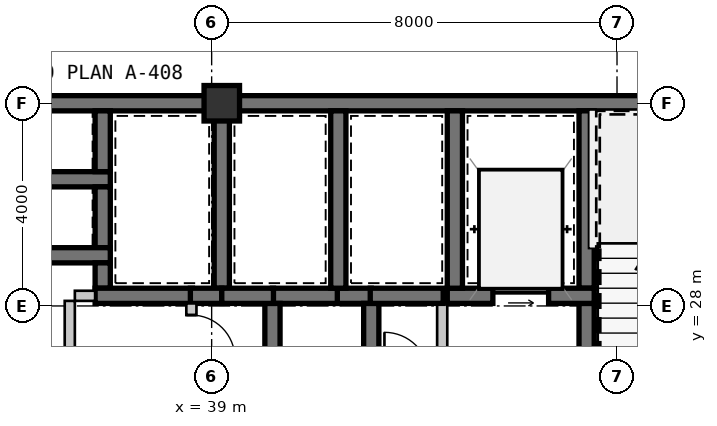
"""IFC4 building model, lengths in metres.
Left out: names, types, materials, properties, quantities, classifications, styles, units other than length and angle.
Written with IfcOpenShell. Run it as: python <this file> out.ifc"""

import sys

from ifc_helpers import new_model, si_unit, direction, frame, frame_2d, origin, origin_2d, place, context, subcontext, project, spatial, rectangle, extrude, source, transform, mapped, element, fill, save


model = new_model("IFC4")
c1 = context("Model", 3, precision=1e-05, world=origin(), true_north=direction((0.0, 1.0)))
c2 = subcontext(c1, "Body", "Model", "MODEL_VIEW")
j1 = project(units=[si_unit("LENGTHUNIT", "METRE"), si_unit("PLANEANGLEUNIT", "RADIAN")], contexts=[c1])
p1 = place(None, origin())
s1 = spatial("IfcSite", under=j1, at=p1, CompositionType="ELEMENT")
p2 = place(p1, origin())
s2 = spatial("IfcBuilding", under=s1, at=p2, CompositionType="ELEMENT")
p3 = place(p2, frame((0.0, 0.0, 99.75)))
s3 = spatial("IfcBuildingStorey", under=s2, at=p3, CompositionType="ELEMENT", Elevation=99.75)
m1 = source(origin(), c2, "Body", "SweptSolid", [
    extrude(rectangle(XDim=0.7, YDim=0.7, at=origin_2d()), origin(), (0.0, 0.0, 1.0), 3.15),
])
p4 = place(p3, frame((39.2, 32.0, 0.0), z_axis=(0.0, 0.0, 1.0), x_axis=(1.0, 0.0, 0.0)))
e1 = element("IfcColumn", 1, at=p4, inside=s3, PredefinedType="COLUMN", context=c2, shape_type="MappedRepresentation", body=[
    mapped(m1, transform((0.0, 0.0, 0.0), scale=1.0)),
])
m2 = source(origin(), c2, "Body", "SweptSolid", [
    extrude(rectangle(XDim=11.2, YDim=0.3, at=frame_2d((5.6, 0.0))), origin(), (0.0, 0.0, 1.0), 2.93),
])
p5 = place(p3, frame((28.0, 32.0, 0.0), z_axis=(0.0, 0.0, 1.0), x_axis=(1.0, 0.0, 0.0)))
e2 = element("IfcWall", 2, at=p5, inside=s3, PredefinedType="SHEAR", context=c2, shape_type="MappedRepresentation", body=[
    mapped(m2, transform((0.0, 0.0, 0.0), scale=1.0)),
])
m3 = source(origin(), c2, "Body", "SweptSolid", [
    extrude(rectangle(XDim=11.95, YDim=0.3, at=frame_2d((5.975, 0.0))), origin(), (0.0, 0.0, 1.0), 2.93),
])
p6 = place(p3, frame((39.2, 32.0, 0.0), z_axis=(0.0, 0.0, 1.0), x_axis=(1.0, 0.0, 0.0)))
e3 = element("IfcWall", 3, at=p6, inside=s3, PredefinedType="SHEAR", context=c2, shape_type="MappedRepresentation", body=[
    mapped(m3, transform((0.0, 0.0, 0.0), scale=1.0)),
])
m4 = source(origin(), c2, "Body", "SweptSolid", [
    extrude(rectangle(XDim=3.5, YDim=0.3, at=frame_2d((1.75, 0.0))), origin(), (0.0, 0.0, 1.0), 2.93),
])
p7 = place(p3, frame((46.4, 31.85, 0.0), z_axis=(0.0, 0.0, 1.0), x_axis=(0.0, -1.0, 0.0)))
e4 = element("IfcWall", 4, at=p7, inside=s3, PredefinedType="SHEAR", context=c2, shape_type="MappedRepresentation", body=[
    mapped(m4, transform((0.0, 0.0, 0.0), scale=1.0)),
])
m5 = source(origin(), c2, "Body", "SweptSolid", [
    extrude(rectangle(XDim=3.9, YDim=0.3, at=frame_2d((1.95, 0.0))), origin(), (0.0, 0.0, 1.0), 2.93),
])
p8 = place(p3, frame((46.4, 28.05, 0.0), z_axis=(0.0, 0.0, 1.0), x_axis=(0.0, -1.0, 0.0)))
e5 = element("IfcWall", 5, at=p8, inside=s3, PredefinedType="SHEAR", context=c2, shape_type="MappedRepresentation", body=[
    mapped(m5, transform((0.0, 0.0, 0.0), scale=1.0)),
])
m6 = source(origin(), c2, "Body", "SweptSolid", [
    extrude(rectangle(XDim=1.05, YDim=2.1, at=frame_2d((0.525, 1.05))), frame((0.0, 0.16, 0.0), z_axis=(0.0, -1.0, 0.0), x_axis=(1.0, 0.0, 0.0)), (0.0, 0.0, 1.0), 0.32),
])
p9 = place(p8, frame((2.125, 0.0, 0.0)))
e6 = element("IfcOpeningElement", 6, at=p9, cuts=e5, PredefinedType="OPENING", context=c2, shape_type="MappedRepresentation", body=[
    mapped(m6, transform((0.0, 0.0, 0.0), scale=1.0)),
])
m7 = source(origin(), c2, "Body", "SweptSolid", [
    extrude(rectangle(XDim=2.9, YDim=0.3, at=frame_2d((1.45, 0.0))), origin(), (0.0, 0.0, 1.0), 2.93),
])
p10 = place(p3, frame((43.65, 28.2, 0.0), z_axis=(0.0, 0.0, 1.0), x_axis=(1.0, 0.0, 0.0)))
e7 = element("IfcWall", 7, at=p10, inside=s3, PredefinedType="SHEAR", context=c2, shape_type="MappedRepresentation", body=[
    mapped(m7, transform((0.0, 0.0, 0.0), scale=1.0)),
])
m8 = source(origin(), c2, "Body", "SweptSolid", [
    extrude(rectangle(XDim=1.1, YDim=2.15, at=frame_2d((0.55, 1.075))), frame((0.0, 0.16, 0.0), z_axis=(0.0, -1.0, 0.0), x_axis=(1.0, 0.0, 0.0)), (0.0, 0.0, 1.0), 0.32),
])
p11 = place(p10, frame((0.9, 0.0, 0.0)))
e8 = element("IfcOpeningElement", 8, at=p11, cuts=e7, PredefinedType="OPENING", context=c2, shape_type="MappedRepresentation", body=[
    mapped(m8, transform((0.0, 0.0, 0.0), scale=1.0)),
])
p12 = place(p3, frame((43.8, 31.85, 0.0), z_axis=(0.0, 0.0, 1.0), x_axis=(0.0, -1.0, 0.0)))
e9 = element("IfcWall", 9, at=p12, inside=s3, PredefinedType="SHEAR", context=c2, shape_type="MappedRepresentation", body=[
    mapped(m4, transform((0.0, 0.0, 0.0), scale=1.0)),
])
m9 = source(origin(), c2, "Body", "SweptSolid", [
    extrude(rectangle(XDim=1.35, YDim=0.2, at=frame_2d((0.675, 0.0))), origin(), (0.0, 0.0, 1.0), 2.93),
])
p13 = place(p3, frame((43.55, 28.05, 0.0), z_axis=(0.0, 0.0, 1.0), x_axis=(0.0, -1.0, 0.0)))
e10 = element("IfcWall", 10, at=p13, inside=s3, PredefinedType="SOLIDWALL", context=c2, shape_type="MappedRepresentation", body=[
    mapped(m9, transform((0.0, 0.0, 0.0), scale=1.0)),
])
m10 = source(origin(), c2, "Body", "SweptSolid", [
    extrude(rectangle(XDim=2.0, YDim=0.3, at=frame_2d((1.0, 0.0))), origin(), (0.0, 0.0, 1.0), 2.93),
])
p14 = place(p3, frame((35.0, 30.5, 0.0), z_axis=(0.0, 0.0, 1.0), x_axis=(1.0, 0.0, 0.0)))
e11 = element("IfcWall", 11, at=p14, inside=s3, PredefinedType="SHEAR", context=c2, shape_type="MappedRepresentation", body=[
    mapped(m10, transform((0.0, 0.0, 0.0), scale=1.0)),
])
m11 = source(origin(), c2, "Body", "SweptSolid", [
    extrude(rectangle(XDim=1.2, YDim=0.3, at=frame_2d((0.6, 0.0))), origin(), (0.0, 0.0, 1.0), 2.93),
])
for number, where, z_axis, x_axis in (
    (12, (36.85, 30.65, 0.0), (0.0, 0.0, 1.0), (0.0, 1.0, 0.0)),
    (13, (36.85, 29.15, 0.0), (0.0, 0.0, 1.0), (0.0, 1.0, 0.0)),
):
    element("IfcWall", number, at=place(p3, frame(where, z_axis=z_axis, x_axis=x_axis)), inside=s3, PredefinedType="SHEAR", context=c2, shape_type="MappedRepresentation", body=[
        mapped(m11, transform((0.0, 0.0, 0.0), scale=1.0)),
    ])
p15 = place(p3, frame((35.0, 29.0, 0.0), z_axis=(0.0, 0.0, 1.0), x_axis=(1.0, 0.0, 0.0)))
e14 = element("IfcWall", 14, at=p15, inside=s3, PredefinedType="SHEAR", context=c2, shape_type="MappedRepresentation", body=[
    mapped(m10, transform((0.0, 0.0, 0.0), scale=1.0)),
])
m12 = source(origin(), c2, "Body", "SweptSolid", [
    extrude(rectangle(XDim=1.32, YDim=0.3, at=frame_2d((0.66, 0.0))), origin(), (0.0, 0.0, 1.0), 2.93),
])
p16 = place(p3, frame((41.52, 28.2, 0.0), z_axis=(0.0, 0.0, 1.0), x_axis=(-1.0, 0.0, 0.0)))
e15 = element("IfcWall", 15, at=p16, inside=s3, PredefinedType="SHEAR", context=c2, shape_type="MappedRepresentation", body=[
    mapped(m12, transform((0.0, 0.0, 0.0), scale=1.0)),
])
m13 = source(origin(), c2, "Body", "SweptSolid", [
    extrude(rectangle(XDim=0.67, YDim=0.3, at=frame_2d((0.335, 0.0))), origin(), (0.0, 0.0, 1.0), 2.93),
])
p17 = place(p3, frame((42.15, 28.2, 0.0), z_axis=(0.0, 0.0, 1.0), x_axis=(-1.0, 0.0, 0.0)))
e16 = element("IfcWall", 16, at=p17, inside=s3, PredefinedType="SHEAR", context=c2, shape_type="MappedRepresentation", body=[
    mapped(m13, transform((0.0, 0.0, 0.0), scale=1.0)),
])
m14 = source(origin(), c2, "Body", "SweptSolid", [
    extrude(rectangle(XDim=1.3, YDim=0.3, at=frame_2d((0.65, 0.0))), origin(), (0.0, 0.0, 1.0), 2.93),
])
for number, where, z_axis, x_axis in (
    (17, (40.2, 28.05, 0.0), (0.0, 0.0, 1.0), (0.0, -1.0, 0.0)),
    (18, (42.15, 26.75, 0.0), (0.0, 0.0, 1.0), (0.0, 1.0, 0.0)),
):
    element("IfcWall", number, at=place(p3, frame(where, z_axis=z_axis, x_axis=x_axis)), inside=s3, PredefinedType="SHEAR", context=c2, shape_type="MappedRepresentation", body=[
        mapped(m14, transform((0.0, 0.0, 0.0), scale=1.0)),
    ])
p18 = place(p3, frame((39.2, 28.35, 0.0), z_axis=(0.0, 0.0, 1.0), x_axis=(0.0, 1.0, 0.0)))
e19 = element("IfcWall", 19, at=p18, inside=s3, PredefinedType="SHEAR", context=c2, shape_type="MappedRepresentation", body=[
    mapped(m4, transform((0.0, 0.0, 0.0), scale=1.0)),
])
m15 = source(origin(), c2, "Body", "SweptSolid", [
    extrude(rectangle(XDim=0.5, YDim=0.3, at=frame_2d((0.25, 0.0))), origin(), (0.0, 0.0, 1.0), 2.93),
])
p19 = place(p3, frame((36.85, 28.85, 0.0), z_axis=(0.0, 0.0, 1.0), x_axis=(0.0, -1.0, 0.0)))
e20 = element("IfcWall", 20, at=p19, inside=s3, PredefinedType="SHEAR", context=c2, shape_type="MappedRepresentation", body=[
    mapped(m15, transform((0.0, 0.0, 0.0), scale=1.0)),
])
m16 = source(origin(), c2, "Body", "SweptSolid", [
    extrude(rectangle(XDim=1.92, YDim=0.3, at=frame_2d((0.96, 0.0))), origin(), (0.0, 0.0, 1.0), 2.93),
])
p20 = place(p3, frame((36.7, 28.2, 0.0), z_axis=(0.0, 0.0, 1.0), x_axis=(1.0, 0.0, 0.0)))
e21 = element("IfcWall", 21, at=p20, inside=s3, PredefinedType="SHEAR", context=c2, shape_type="MappedRepresentation", body=[
    mapped(m16, transform((0.0, 0.0, 0.0), scale=1.0)),
])
m17 = source(origin(), c2, "Body", "SweptSolid", [
    extrude(rectangle(XDim=0.62, YDim=0.3, at=frame_2d((0.31, 0.0))), origin(), (0.0, 0.0, 1.0), 2.93),
])
p21 = place(p3, frame((38.58, 28.2, 0.0), z_axis=(0.0, 0.0, 1.0), x_axis=(1.0, 0.0, 0.0)))
e22 = element("IfcWall", 22, at=p21, inside=s3, PredefinedType="SHEAR", context=c2, shape_type="MappedRepresentation", body=[
    mapped(m17, transform((0.0, 0.0, 0.0), scale=1.0)),
])
p22 = place(p3, frame((41.5, 28.35, 0.0), z_axis=(0.0, 0.0, 1.0), x_axis=(0.0, 1.0, 0.0)))
e23 = element("IfcWall", 23, at=p22, inside=s3, PredefinedType="SHEAR", context=c2, shape_type="MappedRepresentation", body=[
    mapped(m4, transform((0.0, 0.0, 0.0), scale=1.0)),
])
m18 = source(origin(), c2, "Body", "SweptSolid", [
    extrude(rectangle(XDim=1.02, YDim=0.3, at=frame_2d((0.51, 0.0))), origin(), (0.0, 0.0, 1.0), 2.93),
])
p23 = place(p3, frame((39.2, 28.2, 0.0), z_axis=(0.0, 0.0, 1.0), x_axis=(1.0, 0.0, 0.0)))
e24 = element("IfcWall", 24, at=p23, inside=s3, PredefinedType="SHEAR", context=c2, shape_type="MappedRepresentation", body=[
    mapped(m18, transform((0.0, 0.0, 0.0), scale=1.0)),
])
m19 = source(origin(), c2, "Body", "SweptSolid", [
    extrude(rectangle(XDim=1.44, YDim=0.3, at=frame_2d((0.72, 0.0))), origin(), (0.0, 0.0, 1.0), 2.93),
])
p24 = place(p3, frame((42.13, 28.2, 0.0), z_axis=(0.0, 0.0, 1.0), x_axis=(1.0, 0.0, 0.0)))
e25 = element("IfcWall", 25, at=p24, inside=s3, PredefinedType="SHEAR", context=c2, shape_type="MappedRepresentation", body=[
    mapped(m19, transform((0.0, 0.0, 0.0), scale=1.0)),
])
m20 = source(origin(), c2, "Body", "SweptSolid", [
    extrude(rectangle(XDim=1.9, YDim=0.2, at=frame_2d((0.95, 0.0))), origin(), (0.0, 0.0, 1.0), 2.93),
])
p25 = place(p3, frame((36.2, 28.1, 0.0), z_axis=(0.0, 0.0, 1.0), x_axis=(0.0, -1.0, 0.0)))
e26 = element("IfcWall", 26, at=p25, inside=s3, PredefinedType="SOLIDWALL", context=c2, shape_type="MappedRepresentation", body=[
    mapped(m20, transform((0.0, 0.0, 0.0), scale=1.0)),
])
m21 = source(origin(), c2, "Body", "SweptSolid", [
    extrude(rectangle(XDim=0.4, YDim=0.2, at=frame_2d((0.2, 0.0))), origin(), (0.0, 0.0, 1.0), 2.93),
])
p26 = place(p3, frame((36.7, 28.2, 0.0), z_axis=(0.0, 0.0, 1.0), x_axis=(-1.0, 0.0, 0.0)))
e27 = element("IfcWall", 27, at=p26, inside=s3, PredefinedType="SOLIDWALL", context=c2, shape_type="MappedRepresentation", body=[
    mapped(m21, transform((0.0, 0.0, 0.0), scale=1.0)),
])
m22 = source(origin(), c2, "Body", "SweptSolid", [
    extrude(rectangle(XDim=1.47, YDim=0.2, at=frame_2d((0.735, 0.0))), origin(), (0.0, 0.0, 1.0), 2.93),
])
p27 = place(p3, frame((38.6, 28.05, 0.0), z_axis=(0.0, 0.0, 1.0), x_axis=(0.0, -1.0, 0.0)))
e28 = element("IfcWall", 28, at=p27, inside=s3, PredefinedType="SOLIDWALL", context=c2, shape_type="MappedRepresentation", body=[
    mapped(m22, transform((0.0, 0.0, 0.0), scale=1.0)),
])
m23 = source(origin(), c2, "Body", "SweptSolid", [
    extrude(rectangle(XDim=0.86, YDim=2.1, at=frame_2d((0.43, 1.05))), frame((0.0, 0.11, 0.0), z_axis=(0.0, -1.0, 0.0), x_axis=(1.0, 0.0, 0.0)), (0.0, 0.0, 1.0), 0.22),
])
p28 = place(p27, frame((0.23, 0.0, 0.0)))
e29 = element("IfcOpeningElement", 29, at=p28, cuts=e28, PredefinedType="OPENING", context=c2, shape_type="MappedRepresentation", body=[
    mapped(m23, transform((0.0, 0.0, 0.0), scale=1.0)),
])
m24 = source(origin(), c2, "Body", "SweptSolid", [
    extrude(rectangle(XDim=1.1, YDim=2.15, at=frame_2d((0.55, 1.075))), frame((0.0, 0.025, 0.0), z_axis=(0.0, -1.0, 0.0), x_axis=(1.0, 0.0, 0.0)), (0.0, 0.0, 1.0), 0.05),
])
p29 = place(p11, origin())
e30 = element("IfcDoor", 30, at=p29, inside=s3, OperationType="SLIDING_TO_LEFT", PredefinedType="DOOR", context=c2, shape_type="MappedRepresentation", body=[
    mapped(m24, transform((0.0, 0.0, 0.0), scale=1.0)),
])
fill(e8, e30)
m25 = source(origin(), c2, "Body", "SweptSolid", [
    extrude(rectangle(XDim=0.86, YDim=2.1, at=frame_2d((0.43, 1.05))), frame((0.0, 0.025, 0.0), z_axis=(0.0, -1.0, 0.0), x_axis=(1.0, 0.0, 0.0)), (0.0, 0.0, 1.0), 0.05),
])
p30 = place(p28, origin())
e31 = element("IfcDoor", 31, at=p30, inside=s3, OperationType="SINGLE_SWING_RIGHT", PredefinedType="DOOR", context=c2, shape_type="MappedRepresentation", body=[
    mapped(m25, transform((0.0, 0.0, 0.0), scale=1.0)),
])
fill(e29, e31)
save(model, sys.argv[1])
